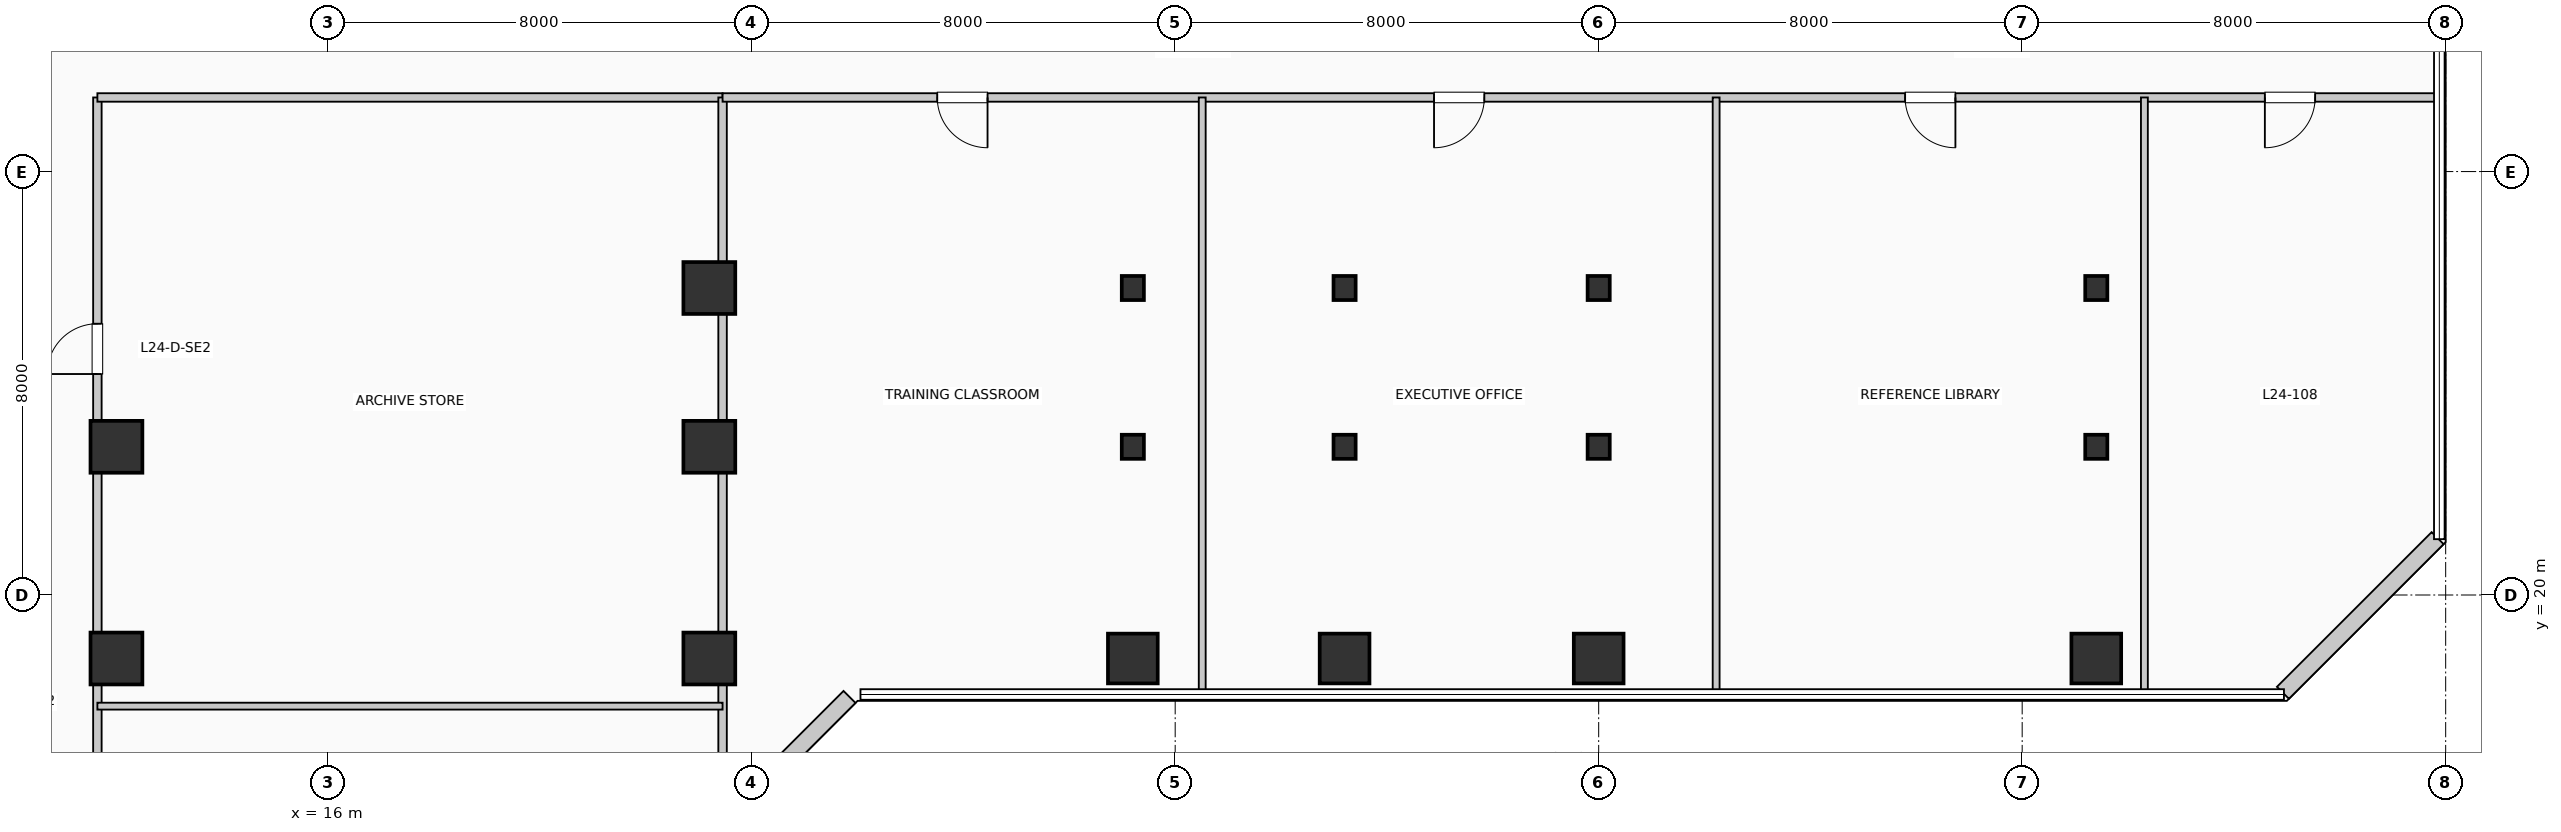
"""IFC4 building model, lengths in metres.
Left out: names, types, materials, properties, quantities, classifications, styles, units other than length and angle.
Written with IfcOpenShell. Run it as: python <this file> out.ifc"""

import sys

from ifc_helpers import new_model, si_unit, direction, frame, frame_2d, origin, origin_2d, place, context, subcontext, project, spatial, rectangle, i_section, extrude, element, fill, save


model = new_model("IFC4")
c1 = context("Model", 3, precision=1e-05, world=origin(), true_north=direction((0.0, 1.0)))
c2 = subcontext(c1, "Body", "Model", "MODEL_VIEW")
j1 = project(units=[si_unit("LENGTHUNIT", "METRE"), si_unit("PLANEANGLEUNIT", "RADIAN")], contexts=[c1])
p1 = place(None, origin())
s1 = spatial("IfcSite", under=j1, at=p1, CompositionType="ELEMENT")
p2 = place(p1, origin())
s2 = spatial("IfcBuilding", under=s1, at=p2, CompositionType="ELEMENT")
p3 = place(p2, frame((0.0, 0.0, 102.63)))
s3 = spatial("IfcBuildingStorey", under=s2, at=p3, CompositionType="ELEMENT", Elevation=102.63)
for number, where, z_axis, x_axis in (
    (1, (12.0, 18.8, 0.0), (0.0, 0.0, 1.0), (1.0, 0.0, 0.0)),
    (2, (12.0, 22.8, 0.0), (0.0, 0.0, 1.0), (1.0, 0.0, 0.0)),
    (3, (23.2, 18.8, 0.0), (0.0, 0.0, 1.0), (1.0, 0.0, 0.0)),
    (4, (23.2, 22.8, 0.0), (0.0, 0.0, 1.0), (1.0, 0.0, 0.0)),
    (5, (23.2, 25.8, 0.0), (0.0, 0.0, 1.0), (1.0, 0.0, 0.0)),
):
    element("IfcColumn", number, at=place(p3, frame(where, z_axis=z_axis, x_axis=x_axis)), inside=s3, PredefinedType="COLUMN", context=c2, shape_type="SweptSolid", body=[
        extrude(rectangle(XDim=0.98, YDim=0.98, at=origin_2d()), origin(), (0.0, 0.0, 1.0), 3.96),
    ])
p4 = place(p3, frame((31.2, 18.8, 0.0), z_axis=(0.0, 0.0, 1.0), x_axis=(1.0, 0.0, 0.0)))
e6 = element("IfcColumn", 6, at=p4, inside=s3, PredefinedType="COLUMN", context=c2, shape_type="SweptSolid", body=[
    extrude(rectangle(XDim=0.94, YDim=0.94, at=origin_2d()), origin(), (0.0, 0.0, 1.0), 3.96),
])
for number, where, z_axis, x_axis in (
    (7, (31.2, 22.8, 0.0), (0.0, 0.0, 1.0), (1.0, 0.0, 0.0)),
    (8, (31.2, 25.8, 0.0), (0.0, 0.0, 1.0), (1.0, 0.0, 0.0)),
):
    element("IfcColumn", number, at=place(p3, frame(where, z_axis=z_axis, x_axis=x_axis)), inside=s3, PredefinedType="COLUMN", context=c2, shape_type="SweptSolid", body=[
        extrude(i_section(OverallWidth=0.418, OverallDepth=0.455, WebThickness=0.032, FlangeThickness=0.051, at=origin_2d()), origin(), (0.0, 0.0, 1.0), 3.96),
    ])
p5 = place(p3, frame((35.2, 18.8, 0.0), z_axis=(0.0, 0.0, 1.0), x_axis=(1.0, 0.0, 0.0)))
e9 = element("IfcColumn", 9, at=p5, inside=s3, PredefinedType="COLUMN", context=c2, shape_type="SweptSolid", body=[
    extrude(rectangle(XDim=0.94, YDim=0.94, at=origin_2d()), origin(), (0.0, 0.0, 1.0), 3.96),
])
for number, where, z_axis, x_axis in (
    (10, (35.2, 22.8, 0.0), (0.0, 0.0, 1.0), (1.0, 0.0, 0.0)),
    (11, (35.2, 25.8, 0.0), (0.0, 0.0, 1.0), (1.0, 0.0, 0.0)),
):
    element("IfcColumn", number, at=place(p3, frame(where, z_axis=z_axis, x_axis=x_axis)), inside=s3, PredefinedType="COLUMN", context=c2, shape_type="SweptSolid", body=[
        extrude(i_section(OverallWidth=0.418, OverallDepth=0.455, WebThickness=0.032, FlangeThickness=0.051, at=origin_2d()), origin(), (0.0, 0.0, 1.0), 3.96),
    ])
p6 = place(p3, frame((40.0, 18.8, 0.0), z_axis=(0.0, 0.0, 1.0), x_axis=(1.0, 0.0, 0.0)))
e12 = element("IfcColumn", 12, at=p6, inside=s3, PredefinedType="COLUMN", context=c2, shape_type="SweptSolid", body=[
    extrude(rectangle(XDim=0.94, YDim=0.94, at=origin_2d()), origin(), (0.0, 0.0, 1.0), 3.96),
])
for number, where, z_axis, x_axis in (
    (13, (40.0, 22.8, 0.0), (0.0, 0.0, 1.0), (1.0, 0.0, 0.0)),
    (14, (40.0, 25.8, 0.0), (0.0, 0.0, 1.0), (1.0, 0.0, 0.0)),
):
    element("IfcColumn", number, at=place(p3, frame(where, z_axis=z_axis, x_axis=x_axis)), inside=s3, PredefinedType="COLUMN", context=c2, shape_type="SweptSolid", body=[
        extrude(i_section(OverallWidth=0.418, OverallDepth=0.455, WebThickness=0.032, FlangeThickness=0.051, at=origin_2d()), origin(), (0.0, 0.0, 1.0), 3.96),
    ])
p7 = place(p3, frame((49.4, 18.8, 0.0), z_axis=(0.0, 0.0, 1.0), x_axis=(1.0, 0.0, 0.0)))
e15 = element("IfcColumn", 15, at=p7, inside=s3, PredefinedType="COLUMN", context=c2, shape_type="SweptSolid", body=[
    extrude(rectangle(XDim=0.94, YDim=0.94, at=origin_2d()), origin(), (0.0, 0.0, 1.0), 3.96),
])
for number, where, z_axis, x_axis in (
    (16, (49.4, 22.8, 0.0), (0.0, 0.0, 1.0), (1.0, 0.0, 0.0)),
    (17, (49.4, 25.8, 0.0), (0.0, 0.0, 1.0), (1.0, 0.0, 0.0)),
):
    element("IfcColumn", number, at=place(p3, frame(where, z_axis=z_axis, x_axis=x_axis)), inside=s3, PredefinedType="COLUMN", context=c2, shape_type="SweptSolid", body=[
        extrude(i_section(OverallWidth=0.418, OverallDepth=0.455, WebThickness=0.032, FlangeThickness=0.051, at=origin_2d()), origin(), (0.0, 0.0, 1.0), 3.96),
    ])
p8 = place(p3, frame((23.926, 16.152, 0.0), z_axis=(0.0, 0.0, 1.0), x_axis=(0.707106781187, 0.707106781187, 0.0)))
e18 = element("IfcWall", 18, at=p8, inside=s3, PredefinedType="SOLIDWALL", context=c2, shape_type="SweptSolid", body=[
    extrude(rectangle(XDim=2.718, YDim=0.32, at=frame_2d((1.359, 0.0))), origin(), (0.0, 0.0, 1.0), 3.71),
])
p9 = place(p3, frame((52.926, 18.152, 0.0), z_axis=(0.0, 0.0, 1.0), x_axis=(0.707106781187, 0.707106781187, 0.0)))
e19 = element("IfcWall", 19, at=p9, inside=s3, PredefinedType="SOLIDWALL", context=c2, shape_type="SweptSolid", body=[
    extrude(rectangle(XDim=4.133, YDim=0.32, at=frame_2d((2.066, 0.0))), origin(), (0.0, 0.0, 1.0), 3.71),
])
p10 = place(p3, frame((11.64, 6.4, 0.0), z_axis=(0.0, 0.0, 1.0), x_axis=(0.0, 1.0, 0.0)))
e20 = element("IfcWall", 20, at=p10, inside=s3, PredefinedType="PARTITIONING", context=c2, shape_type="SweptSolid", body=[
    extrude(rectangle(XDim=23.0, YDim=0.16, at=frame_2d((11.5, 0.0))), origin(), (0.0, 0.0, 1.0), 2.995),
])
p11 = place(p10, frame((4.275, 0.0, 0.0)))
e21 = element("IfcOpeningElement", 21, at=p11, cuts=e20, PredefinedType="OPENING", context=c2, shape_type="SweptSolid", body=[
    extrude(rectangle(XDim=0.95, YDim=2.15, at=frame_2d((0.475, 1.075))), frame((0.0, 0.09, 0.0), z_axis=(0.0, -1.0, 0.0), x_axis=(1.0, 0.0, 0.0)), (0.0, 0.0, 1.0), 0.18),
])
p12 = place(p10, frame((17.775, 0.0, 0.0)))
e22 = element("IfcOpeningElement", 22, at=p12, cuts=e20, PredefinedType="OPENING", context=c2, shape_type="SweptSolid", body=[
    extrude(rectangle(XDim=0.95, YDim=2.15, at=frame_2d((0.475, 1.075))), frame((0.0, 0.09, 0.0), z_axis=(0.0, -1.0, 0.0), x_axis=(1.0, 0.0, 0.0)), (0.0, 0.0, 1.0), 0.18),
])
p13 = place(p3, frame((11.64, 29.4, 0.0), z_axis=(0.0, 0.0, 1.0), x_axis=(1.0, 0.0, 0.0)))
e23 = element("IfcWall", 23, at=p13, inside=s3, PredefinedType="PARTITIONING", context=c2, shape_type="SweptSolid", body=[
    extrude(rectangle(XDim=11.81, YDim=0.16, at=frame_2d((5.905, 0.0))), origin(), (0.0, 0.0, 1.0), 3.71),
])
p14 = place(p3, frame((23.45, 1.04, 0.0), z_axis=(0.0, 0.0, 1.0), x_axis=(0.0, 1.0, 0.0)))
e24 = element("IfcWall", 24, at=p14, inside=s3, PredefinedType="PARTITIONING", context=c2, shape_type="SweptSolid", body=[
    extrude(rectangle(XDim=28.36, YDim=0.16, at=frame_2d((14.18, 0.0))), origin(), (0.0, 0.0, 1.0), 2.995),
])
p15 = place(p3, frame((11.64, 17.9, 0.0), z_axis=(0.0, 0.0, 1.0), x_axis=(1.0, 0.0, 0.0)))
e25 = element("IfcWall", 25, at=p15, inside=s3, PredefinedType="PARTITIONING", context=c2, shape_type="SweptSolid", body=[
    extrude(rectangle(XDim=11.81, YDim=0.13, at=frame_2d((5.905, 0.0))), origin(), (0.0, 0.0, 1.0), 3.71),
])
p16 = place(p3, frame((23.45, 29.4, 0.0), z_axis=(0.0, 0.0, 1.0), x_axis=(1.0, 0.0, 0.0)))
e26 = element("IfcWall", 26, at=p16, inside=s3, PredefinedType="PARTITIONING", context=c2, shape_type="SweptSolid", body=[
    extrude(rectangle(XDim=32.36, YDim=0.16, at=frame_2d((16.18, 0.0))), origin(), (0.0, 0.0, 1.0), 3.365),
])
p17 = place(p16, frame((5.005, 0.0, 0.0), z_axis=(0.0, 0.0, 1.0), x_axis=(-1.0, 0.0, 0.0)))
e27 = element("IfcOpeningElement", 27, at=p17, cuts=e26, PredefinedType="OPENING", context=c2, shape_type="SweptSolid", body=[
    extrude(rectangle(XDim=0.95, YDim=2.15, at=frame_2d((0.475, 1.075))), frame((0.0, 0.09, 0.0), z_axis=(0.0, -1.0, 0.0), x_axis=(1.0, 0.0, 0.0)), (0.0, 0.0, 1.0), 0.18),
])
p18 = place(p16, frame((14.39, 0.0, 0.0), z_axis=(0.0, 0.0, 1.0), x_axis=(-1.0, 0.0, 0.0)))
e28 = element("IfcOpeningElement", 28, at=p18, cuts=e26, PredefinedType="OPENING", context=c2, shape_type="SweptSolid", body=[
    extrude(rectangle(XDim=0.95, YDim=2.15, at=frame_2d((0.475, 1.075))), frame((0.0, 0.09, 0.0), z_axis=(0.0, -1.0, 0.0), x_axis=(1.0, 0.0, 0.0)), (0.0, 0.0, 1.0), 0.18),
])
p19 = place(p16, frame((23.289, 0.0, 0.0), z_axis=(0.0, 0.0, 1.0), x_axis=(-1.0, 0.0, 0.0)))
e29 = element("IfcOpeningElement", 29, at=p19, cuts=e26, PredefinedType="OPENING", context=c2, shape_type="SweptSolid", body=[
    extrude(rectangle(XDim=0.95, YDim=2.15, at=frame_2d((0.475, 1.075))), frame((0.0, 0.09, 0.0), z_axis=(0.0, -1.0, 0.0), x_axis=(1.0, 0.0, 0.0)), (0.0, 0.0, 1.0), 0.18),
])
p20 = place(p16, frame((30.084, 0.0, 0.0), z_axis=(0.0, 0.0, 1.0), x_axis=(-1.0, 0.0, 0.0)))
e30 = element("IfcOpeningElement", 30, at=p20, cuts=e26, PredefinedType="OPENING", context=c2, shape_type="SweptSolid", body=[
    extrude(rectangle(XDim=0.95, YDim=2.15, at=frame_2d((0.475, 1.075))), frame((0.0, 0.09, 0.0), z_axis=(0.0, -1.0, 0.0), x_axis=(1.0, 0.0, 0.0)), (0.0, 0.0, 1.0), 0.18),
])
for number, where, z_axis, x_axis in (
    (31, (32.511, 18.19, 0.0), (0.0, 0.0, 1.0), (0.0, 1.0, 0.0)),
    (32, (42.219, 18.19, 0.0), (0.0, 0.0, 1.0), (0.0, 1.0, 0.0)),
    (33, (50.309, 18.19, 0.0), (0.0, 0.0, 1.0), (0.0, 1.0, 0.0)),
):
    element("IfcWall", number, at=place(p3, frame(where, z_axis=z_axis, x_axis=x_axis)), inside=s3, PredefinedType="PARTITIONING", context=c2, shape_type="SweptSolid", body=[
        extrude(rectangle(XDim=11.21, YDim=0.13, at=frame_2d((5.605, 0.0))), origin(), (0.0, 0.0, 1.0), 3.71),
    ])
p21 = place(p12, origin())
e34 = element("IfcDoor", 34, at=p21, inside=s3, OperationType="SINGLE_SWING_LEFT", PredefinedType="DOOR", context=c2, shape_type="SweptSolid", body=[
    extrude(rectangle(XDim=0.95, YDim=2.15, at=frame_2d((0.475, 1.075))), frame((0.0, 0.025, 0.0), z_axis=(0.0, -1.0, 0.0), x_axis=(1.0, 0.0, 0.0)), (0.0, 0.0, 1.0), 0.05),
])
fill(e22, e34)
p22 = place(p17, origin())
e35 = element("IfcDoor", 35, at=p22, inside=s3, OperationType="SINGLE_SWING_RIGHT", PredefinedType="DOOR", context=c2, shape_type="SweptSolid", body=[
    extrude(rectangle(XDim=0.95, YDim=2.15, at=frame_2d((0.475, 1.075))), frame((0.0, 0.025, 0.0), z_axis=(0.0, -1.0, 0.0), x_axis=(1.0, 0.0, 0.0)), (0.0, 0.0, 1.0), 0.05),
])
fill(e27, e35)
p23 = place(p18, origin())
e36 = element("IfcDoor", 36, at=p23, inside=s3, OperationType="SINGLE_SWING_LEFT", PredefinedType="DOOR", context=c2, shape_type="SweptSolid", body=[
    extrude(rectangle(XDim=0.95, YDim=2.15, at=frame_2d((0.475, 1.075))), frame((0.0, 0.025, 0.0), z_axis=(0.0, -1.0, 0.0), x_axis=(1.0, 0.0, 0.0)), (0.0, 0.0, 1.0), 0.05),
])
fill(e28, e36)
p24 = place(p19, origin())
e37 = element("IfcDoor", 37, at=p24, inside=s3, OperationType="SINGLE_SWING_RIGHT", PredefinedType="DOOR", context=c2, shape_type="SweptSolid", body=[
    extrude(rectangle(XDim=0.95, YDim=2.15, at=frame_2d((0.475, 1.075))), frame((0.0, 0.025, 0.0), z_axis=(0.0, -1.0, 0.0), x_axis=(1.0, 0.0, 0.0)), (0.0, 0.0, 1.0), 0.05),
])
fill(e29, e37)
p25 = place(p20, origin())
e38 = element("IfcDoor", 38, at=p25, inside=s3, OperationType="SINGLE_SWING_LEFT", PredefinedType="DOOR", context=c2, shape_type="SweptSolid", body=[
    extrude(rectangle(XDim=0.95, YDim=2.15, at=frame_2d((0.475, 1.075))), frame((0.0, 0.025, 0.0), z_axis=(0.0, -1.0, 0.0), x_axis=(1.0, 0.0, 0.0)), (0.0, 0.0, 1.0), 0.05),
])
fill(e30, e38)
save(model, sys.argv[1])
